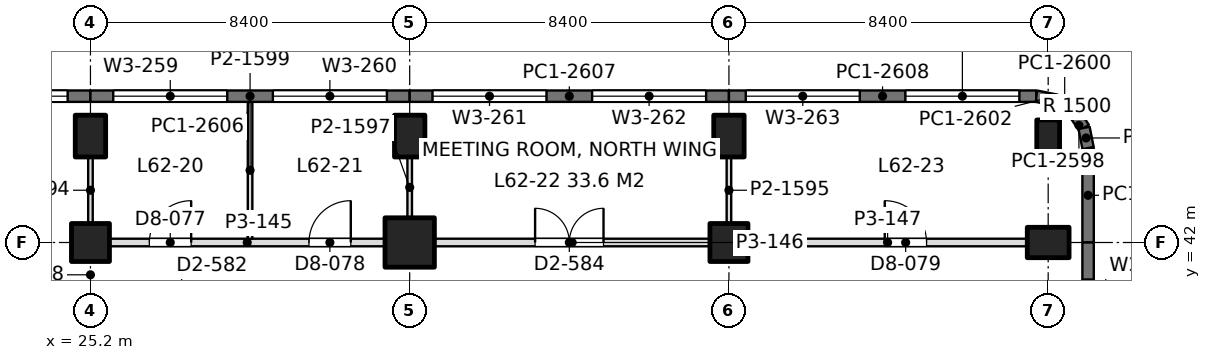
"""IFC4 building model, lengths in metres.
Left out: names, types, materials, properties, quantities, classifications, styles, units other than length and angle.
Written with IfcOpenShell. Run it as: python <this file> out.ifc"""

import sys

from ifc_helpers import new_model, si_unit, direction, frame, frame_2d, origin, origin_2d, place, context, subcontext, project, spatial, rectangle, extrude, element, fill, save


model = new_model("IFC4")
c1 = context("Model", 3, precision=1e-05, world=origin(), true_north=direction((0.0, 1.0)))
c2 = subcontext(c1, "Body", "Model", "MODEL_VIEW")
j1 = project(units=[si_unit("LENGTHUNIT", "METRE"), si_unit("PLANEANGLEUNIT", "RADIAN")], contexts=[c1])
p1 = place(None, origin())
s1 = spatial("IfcSite", under=j1, at=p1, CompositionType="ELEMENT")
p2 = place(p1, origin())
s2 = spatial("IfcBuilding", under=s1, at=p2, CompositionType="ELEMENT")
p3 = place(p2, frame((0.0, 0.0, 272.7)))
s3 = spatial("IfcBuildingStorey", under=s2, at=p3, CompositionType="ELEMENT", Elevation=272.7)
p4 = place(p3, frame((25.2, 42.0, 0.0), z_axis=(0.0, 0.0, 1.0), x_axis=(1.0, 0.0, 0.0)))
e1 = element("IfcColumn", 1, at=p4, inside=s3, PredefinedType="COLUMN", context=c2, shape_type="SweptSolid", body=[
    extrude(rectangle(XDim=1.0, YDim=1.0, at=origin_2d()), origin(), (0.0, 0.0, 1.0), 4.5),
])
p5 = place(p3, frame((25.2, 44.8, 0.0), z_axis=(0.0, 0.0, 1.0), x_axis=(1.0, 0.0, 0.0)))
e2 = element("IfcColumn", 2, at=p5, inside=s3, PredefinedType="COLUMN", context=c2, shape_type="SweptSolid", body=[
    extrude(rectangle(XDim=0.8, YDim=1.1, at=origin_2d()), origin(), (0.0, 0.0, 1.0), 4.5),
])
p6 = place(p3, frame((33.6, 42.0, 0.0), z_axis=(0.0, 0.0, 1.0), x_axis=(1.0, 0.0, 0.0)))
e3 = element("IfcColumn", 3, at=p6, inside=s3, PredefinedType="COLUMN", context=c2, shape_type="SweptSolid", body=[
    extrude(rectangle(XDim=1.3, YDim=1.3, at=origin_2d()), origin(), (0.0, 0.0, 1.0), 4.5),
])
p7 = place(p3, frame((33.6, 44.8, 0.0), z_axis=(0.0, 0.0, 1.0), x_axis=(1.0, 0.0, 0.0)))
e4 = element("IfcColumn", 4, at=p7, inside=s3, PredefinedType="COLUMN", context=c2, shape_type="SweptSolid", body=[
    extrude(rectangle(XDim=0.8, YDim=1.1, at=origin_2d()), origin(), (0.0, 0.0, 1.0), 4.5),
])
p8 = place(p3, frame((42.0, 42.0, 0.0), z_axis=(0.0, 0.0, 1.0), x_axis=(1.0, 0.0, 0.0)))
e5 = element("IfcColumn", 5, at=p8, inside=s3, PredefinedType="COLUMN", context=c2, shape_type="SweptSolid", body=[
    extrude(rectangle(XDim=1.0, YDim=1.0, at=origin_2d()), origin(), (0.0, 0.0, 1.0), 4.5),
])
for number, where, z_axis, x_axis in (
    (6, (42.0, 44.8, 0.0), (0.0, 0.0, 1.0), (1.0, 0.0, 0.0)),
    (7, (50.4, 42.0, 0.0), (0.0, 0.0, 1.0), (0.0, 1.0, 0.0)),
):
    element("IfcColumn", number, at=place(p3, frame(where, z_axis=z_axis, x_axis=x_axis)), inside=s3, PredefinedType="COLUMN", context=c2, shape_type="SweptSolid", body=[
        extrude(rectangle(XDim=0.8, YDim=1.1, at=origin_2d()), origin(), (0.0, 0.0, 1.0), 4.5),
    ])
p9 = place(p3, frame((50.4, 44.8, 0.0), z_axis=(0.0, 0.0, 1.0), x_axis=(1.0, 0.0, 0.0)))
e8 = element("IfcColumn", 8, at=p9, inside=s3, PredefinedType="COLUMN", context=c2, shape_type="SweptSolid", body=[
    extrude(rectangle(XDim=0.6, YDim=0.85, at=origin_2d()), origin(), (0.0, 0.0, 1.0), 4.5),
])
p10 = place(p3, frame((16.8, 45.85, 0.0), z_axis=(0.0, 0.0, 1.0), x_axis=(1.0, 0.0, 0.0)))
e9 = element("IfcWall", 9, at=p10, inside=s3, PredefinedType="SOLIDWALL", context=c2, shape_type="SweptSolid", body=[
    extrude(rectangle(XDim=8.4, YDim=0.3, at=frame_2d((4.2, 0.0))), origin(), (0.0, 0.0, 1.0), 4.35),
])
p11 = place(p10, frame((0.6, 0.0, 0.9)))
e10 = element("IfcOpeningElement", 10, at=p11, cuts=e9, PredefinedType="OPENING", context=c2, shape_type="SweptSolid", body=[
    extrude(rectangle(XDim=3.0, YDim=2.4, at=frame_2d((1.5, 1.2))), frame((0.0, 0.16, 0.0), z_axis=(0.0, -1.0, 0.0), x_axis=(1.0, 0.0, 0.0)), (0.0, 0.0, 1.0), 0.32),
])
p12 = place(p10, frame((4.8, 0.0, 0.9)))
e11 = element("IfcOpeningElement", 11, at=p12, cuts=e9, PredefinedType="OPENING", context=c2, shape_type="SweptSolid", body=[
    extrude(rectangle(XDim=3.0, YDim=2.4, at=frame_2d((1.5, 1.2))), frame((0.0, 0.16, 0.0), z_axis=(0.0, -1.0, 0.0), x_axis=(1.0, 0.0, 0.0)), (0.0, 0.0, 1.0), 0.32),
])
p13 = place(p3, frame((25.2, 45.85, 0.0), z_axis=(0.0, 0.0, 1.0), x_axis=(1.0, 0.0, 0.0)))
e12 = element("IfcWall", 12, at=p13, inside=s3, PredefinedType="SOLIDWALL", context=c2, shape_type="SweptSolid", body=[
    extrude(rectangle(XDim=8.4, YDim=0.3, at=frame_2d((4.2, 0.0))), origin(), (0.0, 0.0, 1.0), 4.35),
])
p14 = place(p13, frame((0.6, 0.0, 0.9)))
e13 = element("IfcOpeningElement", 13, at=p14, cuts=e12, PredefinedType="OPENING", context=c2, shape_type="SweptSolid", body=[
    extrude(rectangle(XDim=3.0, YDim=2.4, at=frame_2d((1.5, 1.2))), frame((0.0, 0.16, 0.0), z_axis=(0.0, -1.0, 0.0), x_axis=(1.0, 0.0, 0.0)), (0.0, 0.0, 1.0), 0.32),
])
p15 = place(p13, frame((4.8, 0.0, 0.9)))
e14 = element("IfcOpeningElement", 14, at=p15, cuts=e12, PredefinedType="OPENING", context=c2, shape_type="SweptSolid", body=[
    extrude(rectangle(XDim=3.0, YDim=2.4, at=frame_2d((1.5, 1.2))), frame((0.0, 0.16, 0.0), z_axis=(0.0, -1.0, 0.0), x_axis=(1.0, 0.0, 0.0)), (0.0, 0.0, 1.0), 0.32),
])
p16 = place(p3, frame((33.6, 45.85, 0.0), z_axis=(0.0, 0.0, 1.0), x_axis=(1.0, 0.0, 0.0)))
e15 = element("IfcWall", 15, at=p16, inside=s3, PredefinedType="SOLIDWALL", context=c2, shape_type="SweptSolid", body=[
    extrude(rectangle(XDim=8.4, YDim=0.3, at=frame_2d((4.2, 0.0))), origin(), (0.0, 0.0, 1.0), 4.35),
])
p17 = place(p16, frame((0.6, 0.0, 0.9)))
e16 = element("IfcOpeningElement", 16, at=p17, cuts=e15, PredefinedType="OPENING", context=c2, shape_type="SweptSolid", body=[
    extrude(rectangle(XDim=3.0, YDim=2.4, at=frame_2d((1.5, 1.2))), frame((0.0, 0.16, 0.0), z_axis=(0.0, -1.0, 0.0), x_axis=(1.0, 0.0, 0.0)), (0.0, 0.0, 1.0), 0.32),
])
p18 = place(p16, frame((4.8, 0.0, 0.9)))
e17 = element("IfcOpeningElement", 17, at=p18, cuts=e15, PredefinedType="OPENING", context=c2, shape_type="SweptSolid", body=[
    extrude(rectangle(XDim=3.0, YDim=2.4, at=frame_2d((1.5, 1.2))), frame((0.0, 0.16, 0.0), z_axis=(0.0, -1.0, 0.0), x_axis=(1.0, 0.0, 0.0)), (0.0, 0.0, 1.0), 0.32),
])
p19 = place(p3, frame((42.0, 45.85, 0.0), z_axis=(0.0, 0.0, 1.0), x_axis=(1.0, 0.0, 0.0)))
e18 = element("IfcWall", 18, at=p19, inside=s3, PredefinedType="SOLIDWALL", context=c2, shape_type="SweptSolid", body=[
    extrude(rectangle(XDim=8.085, YDim=0.3, at=frame_2d((4.042, 0.0))), origin(), (0.0, 0.0, 1.0), 4.35),
])
p20 = place(p19, frame((0.443, 0.0, 0.9)))
e19 = element("IfcOpeningElement", 19, at=p20, cuts=e18, PredefinedType="OPENING", context=c2, shape_type="SweptSolid", body=[
    extrude(rectangle(XDim=3.0, YDim=2.4, at=frame_2d((1.5, 1.2))), frame((0.0, 0.16, 0.0), z_axis=(0.0, -1.0, 0.0), x_axis=(1.0, 0.0, 0.0)), (0.0, 0.0, 1.0), 0.32),
])
p21 = place(p19, frame((4.643, 0.0, 0.9)))
e20 = element("IfcOpeningElement", 20, at=p21, cuts=e18, PredefinedType="OPENING", context=c2, shape_type="SweptSolid", body=[
    extrude(rectangle(XDim=3.0, YDim=2.4, at=frame_2d((1.5, 1.2))), frame((0.0, 0.16, 0.0), z_axis=(0.0, -1.0, 0.0), x_axis=(1.0, 0.0, 0.0)), (0.0, 0.0, 1.0), 0.32),
])
p22 = place(p3, frame((50.085, 45.85, 0.0), z_axis=(0.0, 0.0, 1.0), x_axis=(0.980702050465, -0.1955082817, 0.0)))
e21 = element("IfcWall", 21, at=p22, inside=s3, PredefinedType="SOLIDWALL", context=c2, shape_type="SweptSolid", body=[
    extrude(rectangle(XDim=0.541, YDim=0.3, at=frame_2d((0.271, 0.0))), origin(), (0.0, 0.0, 1.0), 4.35),
])
p23 = place(p3, frame((50.615, 45.744, 0.0), z_axis=(0.0, 0.0, 1.0), x_axis=(0.831692711774, -0.555236195849, 0.0)))
e22 = element("IfcWall", 22, at=p23, inside=s3, PredefinedType="SOLIDWALL", context=c2, shape_type="SweptSolid", body=[
    extrude(rectangle(XDim=0.525, YDim=0.3, at=frame_2d((0.263, 0.0))), origin(), (0.0, 0.0, 1.0), 4.35),
])
p24 = place(p3, frame((51.052, 45.453, 0.0), z_axis=(0.0, 0.0, 1.0), x_axis=(0.55534295404, -0.831621430339, 0.0)))
e23 = element("IfcWall", 23, at=p24, inside=s3, PredefinedType="SOLIDWALL", context=c2, shape_type="SweptSolid", body=[
    extrude(rectangle(XDim=0.526, YDim=0.3, at=frame_2d((0.263, 0.0))), origin(), (0.0, 0.0, 1.0), 4.35),
])
p25 = place(p3, frame((51.344, 45.015, 0.0), z_axis=(0.0, 0.0, 1.0), x_axis=(0.195073962632, -0.980788534345, 0.0)))
e24 = element("IfcWall", 24, at=p25, inside=s3, PredefinedType="SOLIDWALL", context=c2, shape_type="SweptSolid", body=[
    extrude(rectangle(XDim=0.541, YDim=0.3, at=frame_2d((0.271, 0.0))), origin(), (0.0, 0.0, 1.0), 4.35),
])
p26 = place(p3, frame((51.45, 44.485, 0.0), z_axis=(0.0, 0.0, 1.0), x_axis=(0.0, -1.0, 0.0)))
e25 = element("IfcWall", 25, at=p26, inside=s3, PredefinedType="SOLIDWALL", context=c2, shape_type="SweptSolid", body=[
    extrude(rectangle(XDim=2.485, YDim=0.3, at=frame_2d((1.243, 0.0))), origin(), (0.0, 0.0, 1.0), 4.35),
])
p27 = place(p3, frame((51.45, 42.0, 0.0), z_axis=(0.0, 0.0, 1.0), x_axis=(0.0, -1.0, 0.0)))
e26 = element("IfcWall", 26, at=p27, inside=s3, PredefinedType="SOLIDWALL", context=c2, shape_type="SweptSolid", body=[
    extrude(rectangle(XDim=4.35, YDim=0.3, at=frame_2d((2.175, 0.0))), origin(), (0.0, 0.0, 1.0), 4.35),
])
p28 = place(p27, frame((0.975, 0.0, 0.9)))
e27 = element("IfcOpeningElement", 27, at=p28, cuts=e26, PredefinedType="OPENING", context=c2, shape_type="SweptSolid", body=[
    extrude(rectangle(XDim=2.4, YDim=1.9, at=frame_2d((1.2, 0.95))), frame((0.0, 0.16, 0.0), z_axis=(0.0, -1.0, 0.0), x_axis=(1.0, 0.0, 0.0)), (0.0, 0.0, 1.0), 0.32),
])
p29 = place(p3, frame((25.699, 42.0, 0.0), z_axis=(0.0, 0.0, 1.0), x_axis=(1.0, 0.0, 0.0)))
e28 = element("IfcWall", 28, at=p29, inside=s3, PredefinedType="PARTITIONING", context=c2, shape_type="SweptSolid", body=[
    extrude(rectangle(XDim=7.252, YDim=0.2, at=frame_2d((3.626, 0.0))), origin(), (0.0, 0.0, 1.0), 3.8),
])
p30 = place(p29, frame((1.051, 0.0, 0.0)))
e29 = element("IfcOpeningElement", 29, at=p30, cuts=e28, PredefinedType="OPENING", context=c2, shape_type="SweptSolid", body=[
    extrude(rectangle(XDim=1.1, YDim=2.4, at=frame_2d((0.55, 1.2))), frame((0.0, 0.11, 0.0), z_axis=(0.0, -1.0, 0.0), x_axis=(1.0, 0.0, 0.0)), (0.0, 0.0, 1.0), 0.22),
])
p31 = place(p29, frame((5.251, 0.0, 0.0)))
e30 = element("IfcOpeningElement", 30, at=p31, cuts=e28, PredefinedType="OPENING", context=c2, shape_type="SweptSolid", body=[
    extrude(rectangle(XDim=1.1, YDim=2.4, at=frame_2d((0.55, 1.2))), frame((0.0, 0.11, 0.0), z_axis=(0.0, -1.0, 0.0), x_axis=(1.0, 0.0, 0.0)), (0.0, 0.0, 1.0), 0.22),
])
p32 = place(p3, frame((34.249, 42.0, 0.0), z_axis=(0.0, 0.0, 1.0), x_axis=(1.0, 0.0, 0.0)))
e31 = element("IfcWall", 31, at=p32, inside=s3, PredefinedType="PARTITIONING", context=c2, shape_type="SweptSolid", body=[
    extrude(rectangle(XDim=7.252, YDim=0.2, at=frame_2d((3.626, 0.0))), origin(), (0.0, 0.0, 1.0), 3.8),
])
p33 = place(p32, frame((2.651, 0.0, 0.0)))
e32 = element("IfcOpeningElement", 32, at=p33, cuts=e31, PredefinedType="OPENING", context=c2, shape_type="SweptSolid", body=[
    extrude(rectangle(XDim=1.8, YDim=2.2, at=frame_2d((0.9, 1.1))), frame((0.0, 0.11, 0.0), z_axis=(0.0, -1.0, 0.0), x_axis=(1.0, 0.0, 0.0)), (0.0, 0.0, 1.0), 0.22),
])
p34 = place(p3, frame((42.499, 42.0, 0.0), z_axis=(0.0, 0.0, 1.0), x_axis=(1.0, 0.0, 0.0)))
e33 = element("IfcWall", 33, at=p34, inside=s3, PredefinedType="PARTITIONING", context=c2, shape_type="SweptSolid", body=[
    extrude(rectangle(XDim=7.352, YDim=0.2, at=frame_2d((3.676, 0.0))), origin(), (0.0, 0.0, 1.0), 3.8),
])
p35 = place(p34, frame((3.601, 0.0, 0.0)))
e34 = element("IfcOpeningElement", 34, at=p35, cuts=e33, PredefinedType="OPENING", context=c2, shape_type="SweptSolid", body=[
    extrude(rectangle(XDim=1.1, YDim=2.4, at=frame_2d((0.55, 1.2))), frame((0.0, 0.11, 0.0), z_axis=(0.0, -1.0, 0.0), x_axis=(1.0, 0.0, 0.0)), (0.0, 0.0, 1.0), 0.22),
])
p36 = place(p3, frame((25.2, 42.499, 0.0), z_axis=(0.0, 0.0, 1.0), x_axis=(0.0, 1.0, 0.0)))
e35 = element("IfcWall", 35, at=p36, inside=s3, PredefinedType="PARTITIONING", context=c2, shape_type="SweptSolid", body=[
    extrude(rectangle(XDim=1.752, YDim=0.12, at=frame_2d((0.876, 0.0))), origin(), (0.0, 0.0, 1.0), 3.99),
])
p37 = place(p3, frame((29.4, 42.098, 0.0), z_axis=(0.0, 0.0, 1.0), x_axis=(0.0, 1.0, 0.0)))
e36 = element("IfcWall", 36, at=p37, inside=s3, PredefinedType="PARTITIONING", context=c2, shape_type="SweptSolid", body=[
    extrude(rectangle(XDim=3.604, YDim=0.12, at=frame_2d((1.802, 0.0))), origin(), (0.0, 0.0, 1.0), 3.8),
])
p38 = place(p3, frame((33.6, 42.649, 0.0), z_axis=(0.0, 0.0, 1.0), x_axis=(0.0, 1.0, 0.0)))
e37 = element("IfcWall", 37, at=p38, inside=s3, PredefinedType="PARTITIONING", context=c2, shape_type="SweptSolid", body=[
    extrude(rectangle(XDim=1.602, YDim=0.12, at=frame_2d((0.801, 0.0))), origin(), (0.0, 0.0, 1.0), 3.99),
])
p39 = place(p3, frame((42.0, 42.499, 0.0), z_axis=(0.0, 0.0, 1.0), x_axis=(0.0, 1.0, 0.0)))
e38 = element("IfcWall", 38, at=p39, inside=s3, PredefinedType="PARTITIONING", context=c2, shape_type="SweptSolid", body=[
    extrude(rectangle(XDim=1.752, YDim=0.12, at=frame_2d((0.876, 0.0))), origin(), (0.0, 0.0, 1.0), 3.99),
])
p40 = place(p12, origin())
e39 = element("IfcWindow", 39, at=p40, inside=s3, PartitioningType="SINGLE_PANEL", PredefinedType="WINDOW", context=c2, shape_type="SweptSolid", body=[
    extrude(rectangle(XDim=3.0, YDim=2.4, at=frame_2d((1.5, 1.2))), frame((0.0, 0.03, 0.0), z_axis=(0.0, -1.0, 0.0), x_axis=(1.0, 0.0, 0.0)), (0.0, 0.0, 1.0), 0.06),
])
fill(e11, e39)
p41 = place(p14, origin())
e40 = element("IfcWindow", 40, at=p41, inside=s3, PartitioningType="SINGLE_PANEL", PredefinedType="WINDOW", context=c2, shape_type="SweptSolid", body=[
    extrude(rectangle(XDim=3.0, YDim=2.4, at=frame_2d((1.5, 1.2))), frame((0.0, 0.03, 0.0), z_axis=(0.0, -1.0, 0.0), x_axis=(1.0, 0.0, 0.0)), (0.0, 0.0, 1.0), 0.06),
])
fill(e13, e40)
p42 = place(p15, origin())
e41 = element("IfcWindow", 41, at=p42, inside=s3, PartitioningType="SINGLE_PANEL", PredefinedType="WINDOW", context=c2, shape_type="SweptSolid", body=[
    extrude(rectangle(XDim=3.0, YDim=2.4, at=frame_2d((1.5, 1.2))), frame((0.0, 0.03, 0.0), z_axis=(0.0, -1.0, 0.0), x_axis=(1.0, 0.0, 0.0)), (0.0, 0.0, 1.0), 0.06),
])
fill(e14, e41)
p43 = place(p17, origin())
e42 = element("IfcWindow", 42, at=p43, inside=s3, PartitioningType="SINGLE_PANEL", PredefinedType="WINDOW", context=c2, shape_type="SweptSolid", body=[
    extrude(rectangle(XDim=3.0, YDim=2.4, at=frame_2d((1.5, 1.2))), frame((0.0, 0.03, 0.0), z_axis=(0.0, -1.0, 0.0), x_axis=(1.0, 0.0, 0.0)), (0.0, 0.0, 1.0), 0.06),
])
fill(e16, e42)
p44 = place(p18, origin())
e43 = element("IfcWindow", 43, at=p44, inside=s3, PartitioningType="SINGLE_PANEL", PredefinedType="WINDOW", context=c2, shape_type="SweptSolid", body=[
    extrude(rectangle(XDim=3.0, YDim=2.4, at=frame_2d((1.5, 1.2))), frame((0.0, 0.03, 0.0), z_axis=(0.0, -1.0, 0.0), x_axis=(1.0, 0.0, 0.0)), (0.0, 0.0, 1.0), 0.06),
])
fill(e17, e43)
p45 = place(p20, origin())
e44 = element("IfcWindow", 44, at=p45, inside=s3, PartitioningType="SINGLE_PANEL", PredefinedType="WINDOW", context=c2, shape_type="SweptSolid", body=[
    extrude(rectangle(XDim=3.0, YDim=2.4, at=frame_2d((1.5, 1.2))), frame((0.0, 0.03, 0.0), z_axis=(0.0, -1.0, 0.0), x_axis=(1.0, 0.0, 0.0)), (0.0, 0.0, 1.0), 0.06),
])
fill(e19, e44)
p46 = place(p21, origin())
e45 = element("IfcWindow", 45, at=p46, inside=s3, PartitioningType="SINGLE_PANEL", PredefinedType="WINDOW", context=c2, shape_type="SweptSolid", body=[
    extrude(rectangle(XDim=3.0, YDim=2.4, at=frame_2d((1.5, 1.2))), frame((0.0, 0.03, 0.0), z_axis=(0.0, -1.0, 0.0), x_axis=(1.0, 0.0, 0.0)), (0.0, 0.0, 1.0), 0.06),
])
fill(e20, e45)
p47 = place(p28, origin())
e46 = element("IfcWindow", 46, at=p47, inside=s3, PartitioningType="SINGLE_PANEL", PredefinedType="WINDOW", context=c2, shape_type="SweptSolid", body=[
    extrude(rectangle(XDim=2.4, YDim=1.9, at=frame_2d((1.2, 0.95))), frame((0.0, 0.03, 0.0), z_axis=(0.0, -1.0, 0.0), x_axis=(1.0, 0.0, 0.0)), (0.0, 0.0, 1.0), 0.06),
])
fill(e27, e46)
p48 = place(p30, origin())
e47 = element("IfcDoor", 47, at=p48, inside=s3, OperationType="SINGLE_SWING_RIGHT", PredefinedType="DOOR", context=c2, shape_type="SweptSolid", body=[
    extrude(rectangle(XDim=1.1, YDim=2.4, at=frame_2d((0.55, 1.2))), frame((0.0, 0.025, 0.0), z_axis=(0.0, -1.0, 0.0), x_axis=(1.0, 0.0, 0.0)), (0.0, 0.0, 1.0), 0.05),
])
fill(e29, e47)
p49 = place(p31, origin())
e48 = element("IfcDoor", 48, at=p49, inside=s3, OperationType="SINGLE_SWING_RIGHT", PredefinedType="DOOR", context=c2, shape_type="SweptSolid", body=[
    extrude(rectangle(XDim=1.1, YDim=2.4, at=frame_2d((0.55, 1.2))), frame((0.0, 0.025, 0.0), z_axis=(0.0, -1.0, 0.0), x_axis=(1.0, 0.0, 0.0)), (0.0, 0.0, 1.0), 0.05),
])
fill(e30, e48)
p50 = place(p33, origin())
e49 = element("IfcDoor", 49, at=p50, inside=s3, OperationType="DOUBLE_DOOR_SINGLE_SWING", PredefinedType="DOOR", context=c2, shape_type="SweptSolid", body=[
    extrude(rectangle(XDim=1.8, YDim=2.2, at=frame_2d((0.9, 1.1))), frame((0.0, 0.025, 0.0), z_axis=(0.0, -1.0, 0.0), x_axis=(1.0, 0.0, 0.0)), (0.0, 0.0, 1.0), 0.05),
])
fill(e32, e49)
p51 = place(p35, origin())
e50 = element("IfcDoor", 50, at=p51, inside=s3, OperationType="SINGLE_SWING_LEFT", PredefinedType="DOOR", context=c2, shape_type="SweptSolid", body=[
    extrude(rectangle(XDim=1.1, YDim=2.4, at=frame_2d((0.55, 1.2))), frame((0.0, 0.025, 0.0), z_axis=(0.0, -1.0, 0.0), x_axis=(1.0, 0.0, 0.0)), (0.0, 0.0, 1.0), 0.05),
])
fill(e34, e50)
save(model, sys.argv[1])
